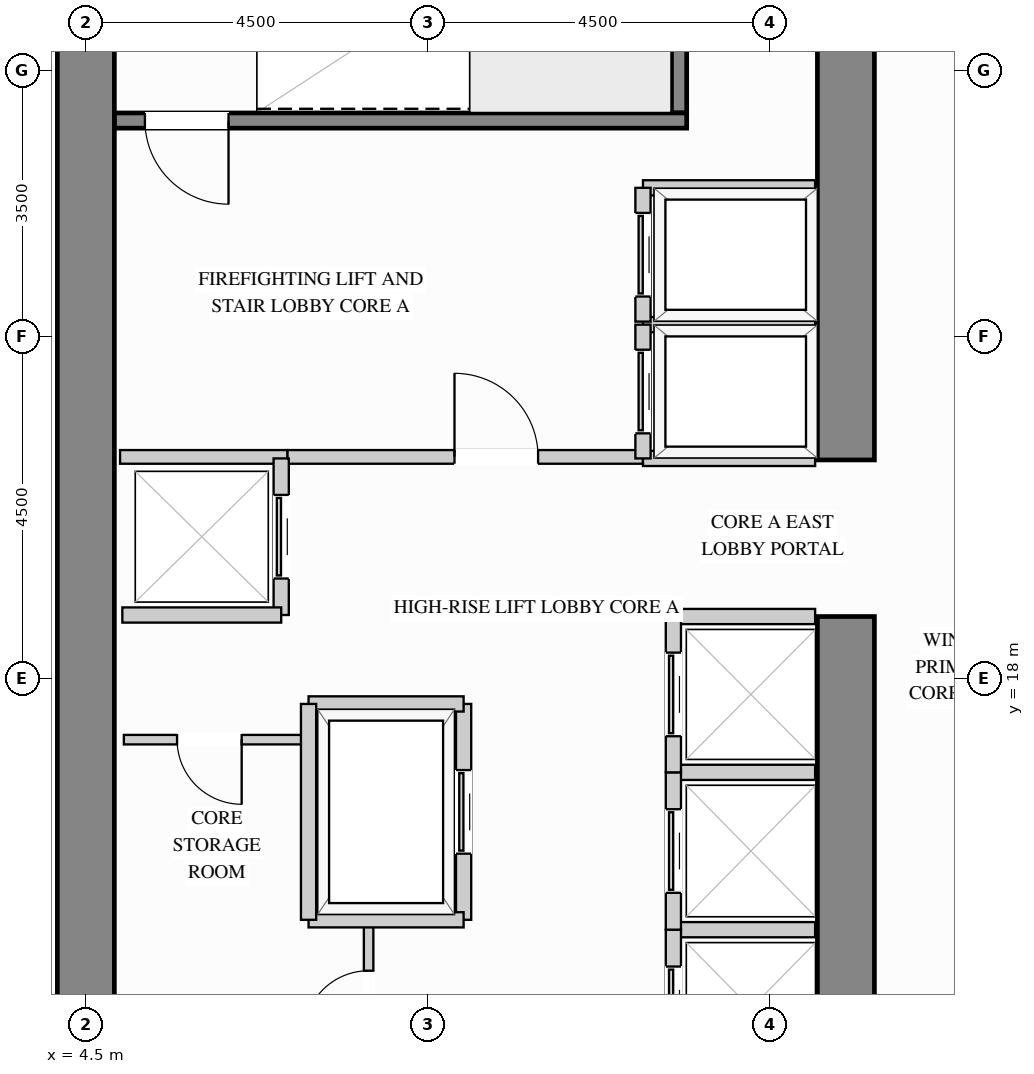
"""IFC4 building model, lengths in metres.
Left out: names, types, materials, properties, quantities, classifications, styles, units other than length and angle.
Written with IfcOpenShell. Run it as: python <this file> out.ifc"""

import sys

from ifc_helpers import new_model, si_unit, direction, frame, frame_2d, origin, place, context, subcontext, project, spatial, rectangle, extrude, source, transform, mapped, element, fill, save


model = new_model("IFC4")
c1 = context("Model", 3, precision=1e-05, world=origin(), true_north=direction((0.0, 1.0)))
c2 = subcontext(c1, "Body", "Model", "MODEL_VIEW")
j1 = project(units=[si_unit("LENGTHUNIT", "METRE"), si_unit("PLANEANGLEUNIT", "RADIAN")], contexts=[c1])
p1 = place(None, origin())
s1 = spatial("IfcSite", under=j1, at=p1, CompositionType="ELEMENT")
p2 = place(p1, origin())
s2 = spatial("IfcBuilding", under=s1, at=p2, CompositionType="ELEMENT")
p3 = place(p2, frame((0.0, 0.0, 106.2)))
s3 = spatial("IfcBuildingStorey", under=s2, at=p3, CompositionType="ELEMENT", Elevation=106.2)
m1 = source(origin(), c2, "Body", "SweptSolid", [
    extrude(rectangle(XDim=9.945, YDim=0.75, at=frame_2d((4.973, 0.0))), origin(), (0.0, 0.0, 1.0), 3.38),
])
p4 = place(p3, frame((14.5, 8.875, 0.0), z_axis=(0.0, 0.0, 1.0), x_axis=(0.0, 1.0, 0.0)))
e1 = element("IfcWall", 1, at=p4, inside=s3, PredefinedType="SHEAR", context=c2, shape_type="MappedRepresentation", body=[
    mapped(m1, transform((0.0, 0.0, 0.0), x_axis=(1.0, 0.0, 0.0), y_axis=(0.0, 1.0, 0.0), z_axis=(0.0, 0.0, 1.0))),
])
m2 = source(origin(), c2, "Body", "SweptSolid", [
    extrude(rectangle(XDim=8.245, YDim=0.75, at=frame_2d((4.123, 0.0))), origin(), (0.0, 0.0, 1.0), 3.38),
])
p5 = place(p3, frame((14.5, 20.88, 0.0), z_axis=(0.0, 0.0, 1.0), x_axis=(0.0, 1.0, 0.0)))
e2 = element("IfcWall", 2, at=p5, inside=s3, PredefinedType="SHEAR", context=c2, shape_type="MappedRepresentation", body=[
    mapped(m2, transform((0.0, 0.0, 0.0), x_axis=(1.0, 0.0, 0.0), y_axis=(0.0, 1.0, 0.0), z_axis=(0.0, 0.0, 1.0))),
])
m3 = source(origin(), c2, "Body", "SweptSolid", [
    extrude(rectangle(XDim=20.25, YDim=0.75, at=frame_2d((10.125, 0.0))), origin(), (0.0, 0.0, 1.0), 3.38),
])
p6 = place(p3, frame((4.5, 8.875, 0.0), z_axis=(0.0, 0.0, 1.0), x_axis=(0.0, 1.0, 0.0)))
e3 = element("IfcWall", 3, at=p6, inside=s3, PredefinedType="SHEAR", context=c2, shape_type="MappedRepresentation", body=[
    mapped(m3, transform((0.0, 0.0, 0.0), x_axis=(1.0, 0.0, 0.0), y_axis=(0.0, 1.0, 0.0), z_axis=(0.0, 0.0, 1.0))),
])
p7 = place(p3, frame((7.15, 20.92, 0.0), z_axis=(0.0, 0.0, 1.0), x_axis=(1.0, 0.0, 0.0)))
e4 = element("IfcWall", 4, at=p7, inside=s3, PredefinedType="PARTITIONING", context=c2, shape_type="SweptSolid", body=[
    extrude(rectangle(XDim=4.68, YDim=0.18, at=frame_2d((2.34, 0.0))), origin(), (0.0, 0.0, 1.0), 3.365),
])
p8 = place(p7, frame((2.2, 0.0, 0.0)))
e5 = element("IfcOpeningElement", 5, at=p8, cuts=e4, PredefinedType="OPENING", context=c2, shape_type="SweptSolid", body=[
    extrude(rectangle(XDim=1.1, YDim=2.15, at=frame_2d((0.55, 1.075))), frame((0.0, 0.1, 0.0), z_axis=(0.0, -1.0, 0.0), x_axis=(1.0, 0.0, 0.0)), (0.0, 0.0, 1.0), 0.2),
])
m4 = source(origin(), c2, "Body", "SweptSolid", [
    extrude(rectangle(XDim=2.2, YDim=0.18, at=frame_2d((1.1, 0.0))), origin(), (0.0, 0.0, 1.0), 3.365),
])
p9 = place(p3, frame((4.95, 20.92, 0.0), z_axis=(0.0, 0.0, 1.0), x_axis=(1.0, 0.0, 0.0)))
e6 = element("IfcWall", 6, at=p9, inside=s3, PredefinedType="PARTITIONING", context=c2, shape_type="MappedRepresentation", body=[
    mapped(m4, transform((0.0, 0.0, 0.0), x_axis=(1.0, 0.0, 0.0), y_axis=(0.0, 1.0, 0.0), z_axis=(0.0, 0.0, 1.0))),
])
p10 = place(p3, frame((8.22, 12.75, 0.0), z_axis=(0.0, 0.0, 1.0), x_axis=(0.0, 1.0, 0.0)))
e7 = element("IfcWall", 7, at=p10, inside=s3, PredefinedType="PARTITIONING", context=c2, shape_type="SweptSolid", body=[
    extrude(rectangle(XDim=2.07, YDim=0.125, at=frame_2d((1.035, 0.0))), origin(), (0.0, 0.0, 1.0), 3.365),
])
p11 = place(p10, frame((0.56, 0.0, 0.0)))
e8 = element("IfcOpeningElement", 8, at=p11, cuts=e7, PredefinedType="OPENING", context=c2, shape_type="SweptSolid", body=[
    extrude(rectangle(XDim=0.85, YDim=2.1, at=frame_2d((0.425, 1.05))), frame((0.0, 0.073, 0.0), z_axis=(0.0, -1.0, 0.0), x_axis=(1.0, 0.0, 0.0)), (0.0, 0.0, 1.0), 0.145),
])
p12 = place(p3, frame((5.0, 17.2, 0.0), z_axis=(0.0, 0.0, 1.0), x_axis=(1.0, 0.0, 0.0)))
e9 = element("IfcWall", 9, at=p12, inside=s3, PredefinedType="PARTITIONING", context=c2, shape_type="SweptSolid", body=[
    extrude(rectangle(XDim=2.4, YDim=0.125, at=frame_2d((1.2, 0.0))), origin(), (0.0, 0.0, 1.0), 3.365),
])
p13 = place(p12, frame((0.7, 0.0, 0.0)))
e10 = element("IfcOpeningElement", 10, at=p13, cuts=e9, PredefinedType="OPENING", context=c2, shape_type="SweptSolid", body=[
    extrude(rectangle(XDim=0.85, YDim=2.1, at=frame_2d((0.425, 1.05))), frame((0.0, 0.073, 0.0), z_axis=(0.0, -1.0, 0.0), x_axis=(1.0, 0.0, 0.0)), (0.0, 0.0, 1.0), 0.145),
])
m5 = source(origin(), c2, "Body", "SweptSolid", [
    extrude(rectangle(XDim=2.265, YDim=0.2, at=frame_2d((1.132, 0.0))), origin(), (0.0, 0.0, 1.0), 3.365),
])
for number, where, z_axis, x_axis in (
    (11, (11.83, 22.66, 0.0), (0.0, 0.0, 1.0), (1.0, 0.0, 0.0)),
    (12, (11.83, 20.9, 0.0), (0.0, 0.0, 1.0), (1.0, 0.0, 0.0)),
):
    element("IfcWall", number, at=place(p3, frame(where, z_axis=z_axis, x_axis=x_axis)), inside=s3, PredefinedType="PARTITIONING", context=c2, shape_type="MappedRepresentation", body=[
        mapped(m5, transform((0.0, 0.0, 0.0), x_axis=(1.0, 0.0, 0.0), y_axis=(0.0, 1.0, 0.0), z_axis=(0.0, 0.0, 1.0))),
    ])
p14 = place(p3, frame((11.83, 20.9, 0.0), z_axis=(0.0, 0.0, 1.0), x_axis=(0.0, 1.0, 0.0)))
e13 = element("IfcWall", 13, at=p14, inside=s3, PredefinedType="PARTITIONING", context=c2, shape_type="SweptSolid", body=[
    extrude(rectangle(XDim=1.76, YDim=0.2, at=frame_2d((0.88, 0.0))), origin(), (0.0, 0.0, 1.0), 3.365),
])
p15 = place(p14, frame((0.33, 0.0, 0.0)))
e14 = element("IfcOpeningElement", 14, at=p15, cuts=e13, PredefinedType="OPENING", context=c2, shape_type="SweptSolid", body=[
    extrude(rectangle(XDim=1.1, YDim=2.2, at=frame_2d((0.55, 1.1))), frame((0.0, 0.11, 0.0), z_axis=(0.0, -1.0, 0.0), x_axis=(1.0, 0.0, 0.0)), (0.0, 0.0, 1.0), 0.22),
])
p16 = place(p3, frame((11.83, 24.46, 0.0), z_axis=(0.0, 0.0, 1.0), x_axis=(1.0, 0.0, 0.0)))
e15 = element("IfcWall", 15, at=p16, inside=s3, PredefinedType="PARTITIONING", context=c2, shape_type="MappedRepresentation", body=[
    mapped(m5, transform((0.0, 0.0, 0.0), x_axis=(1.0, 0.0, 0.0), y_axis=(0.0, 1.0, 0.0), z_axis=(0.0, 0.0, 1.0))),
])
p17 = place(p3, frame((11.83, 22.7, 0.0), z_axis=(0.0, 0.0, 1.0), x_axis=(0.0, 1.0, 0.0)))
e16 = element("IfcWall", 16, at=p17, inside=s3, PredefinedType="PARTITIONING", context=c2, shape_type="SweptSolid", body=[
    extrude(rectangle(XDim=1.76, YDim=0.2, at=frame_2d((0.88, 0.0))), origin(), (0.0, 0.0, 1.0), 3.365),
])
p18 = place(p17, frame((0.33, 0.0, 0.0)))
e17 = element("IfcOpeningElement", 17, at=p18, cuts=e16, PredefinedType="OPENING", context=c2, shape_type="SweptSolid", body=[
    extrude(rectangle(XDim=1.1, YDim=2.2, at=frame_2d((0.55, 1.1))), frame((0.0, 0.11, 0.0), z_axis=(0.0, -1.0, 0.0), x_axis=(1.0, 0.0, 0.0)), (0.0, 0.0, 1.0), 0.22),
])
m6 = source(origin(), c2, "Body", "SweptSolid", [
    extrude(rectangle(XDim=1.865, YDim=0.2, at=frame_2d((0.933, 0.0))), origin(), (0.0, 0.0, 1.0), 3.365),
])
p19 = place(p3, frame((12.23, 14.7, 0.0), z_axis=(0.0, 0.0, 1.0), x_axis=(1.0, 0.0, 0.0)))
e18 = element("IfcWall", 18, at=p19, inside=s3, PredefinedType="PARTITIONING", context=c2, shape_type="MappedRepresentation", body=[
    mapped(m6, transform((0.0, 0.0, 0.0), x_axis=(1.0, 0.0, 0.0), y_axis=(0.0, 1.0, 0.0), z_axis=(0.0, 0.0, 1.0))),
])
p20 = place(p3, frame((12.23, 12.63, 0.0), z_axis=(0.0, 0.0, 1.0), x_axis=(0.0, 1.0, 0.0)))
e19 = element("IfcWall", 19, at=p20, inside=s3, PredefinedType="PARTITIONING", context=c2, shape_type="SweptSolid", body=[
    extrude(rectangle(XDim=2.07, YDim=0.2, at=frame_2d((1.035, 0.0))), origin(), (0.0, 0.0, 1.0), 3.365),
])
p21 = place(p20, frame((0.485, 0.0, 0.0)))
e20 = element("IfcOpeningElement", 20, at=p21, cuts=e19, PredefinedType="OPENING", context=c2, shape_type="SweptSolid", body=[
    extrude(rectangle(XDim=1.1, YDim=2.2, at=frame_2d((0.55, 1.1))), frame((0.0, 0.11, 0.0), z_axis=(0.0, -1.0, 0.0), x_axis=(1.0, 0.0, 0.0)), (0.0, 0.0, 1.0), 0.22),
])
p22 = place(p3, frame((12.23, 16.77, 0.0), z_axis=(0.0, 0.0, 1.0), x_axis=(1.0, 0.0, 0.0)))
e21 = element("IfcWall", 21, at=p22, inside=s3, PredefinedType="PARTITIONING", context=c2, shape_type="MappedRepresentation", body=[
    mapped(m6, transform((0.0, 0.0, 0.0), x_axis=(1.0, 0.0, 0.0), y_axis=(0.0, 1.0, 0.0), z_axis=(0.0, 0.0, 1.0))),
])
p23 = place(p3, frame((12.23, 14.7, 0.0), z_axis=(0.0, 0.0, 1.0), x_axis=(0.0, 1.0, 0.0)))
e22 = element("IfcWall", 22, at=p23, inside=s3, PredefinedType="PARTITIONING", context=c2, shape_type="SweptSolid", body=[
    extrude(rectangle(XDim=2.07, YDim=0.2, at=frame_2d((1.035, 0.0))), origin(), (0.0, 0.0, 1.0), 3.365),
])
p24 = place(p23, frame((0.485, 0.0, 0.0)))
e23 = element("IfcOpeningElement", 23, at=p24, cuts=e22, PredefinedType="OPENING", context=c2, shape_type="SweptSolid", body=[
    extrude(rectangle(XDim=1.1, YDim=2.2, at=frame_2d((0.55, 1.1))), frame((0.0, 0.11, 0.0), z_axis=(0.0, -1.0, 0.0), x_axis=(1.0, 0.0, 0.0)), (0.0, 0.0, 1.0), 0.22),
])
p25 = place(p3, frame((12.23, 18.82, 0.0), z_axis=(0.0, 0.0, 1.0), x_axis=(1.0, 0.0, 0.0)))
e24 = element("IfcWall", 24, at=p25, inside=s3, PredefinedType="PARTITIONING", context=c2, shape_type="MappedRepresentation", body=[
    mapped(m6, transform((0.0, 0.0, 0.0), x_axis=(1.0, 0.0, 0.0), y_axis=(0.0, 1.0, 0.0), z_axis=(0.0, 0.0, 1.0))),
])
p26 = place(p3, frame((12.23, 16.77, 0.0), z_axis=(0.0, 0.0, 1.0), x_axis=(0.0, 1.0, 0.0)))
e25 = element("IfcWall", 25, at=p26, inside=s3, PredefinedType="PARTITIONING", context=c2, shape_type="SweptSolid", body=[
    extrude(rectangle(XDim=2.05, YDim=0.2, at=frame_2d((1.025, 0.0))), origin(), (0.0, 0.0, 1.0), 3.365),
])
p27 = place(p26, frame((0.475, 0.0, 0.0)))
e26 = element("IfcOpeningElement", 26, at=p27, cuts=e25, PredefinedType="OPENING", context=c2, shape_type="SweptSolid", body=[
    extrude(rectangle(XDim=1.1, YDim=2.2, at=frame_2d((0.55, 1.1))), frame((0.0, 0.11, 0.0), z_axis=(0.0, -1.0, 0.0), x_axis=(1.0, 0.0, 0.0)), (0.0, 0.0, 1.0), 0.22),
])
p28 = place(p3, frame((7.07, 18.84, 0.0), z_axis=(0.0, 0.0, 1.0), x_axis=(0.0, 1.0, 0.0)))
e27 = element("IfcWall", 27, at=p28, inside=s3, PredefinedType="PARTITIONING", context=c2, shape_type="SweptSolid", body=[
    extrude(rectangle(XDim=2.06, YDim=0.2, at=frame_2d((1.03, 0.0))), origin(), (0.0, 0.0, 1.0), 3.365),
])
p29 = place(p28, frame((0.48, 0.0, 0.0)))
e28 = element("IfcOpeningElement", 28, at=p29, cuts=e27, PredefinedType="OPENING", context=c2, shape_type="SweptSolid", body=[
    extrude(rectangle(XDim=1.1, YDim=2.2, at=frame_2d((0.55, 1.1))), frame((0.0, 0.11, 0.0), z_axis=(0.0, -1.0, 0.0), x_axis=(1.0, 0.0, 0.0)), (0.0, 0.0, 1.0), 0.22),
])
m7 = source(origin(), c2, "Body", "SweptSolid", [
    extrude(rectangle(XDim=2.09, YDim=0.2, at=frame_2d((1.045, 0.0))), origin(), (0.0, 0.0, 1.0), 3.365),
])
p30 = place(p3, frame((4.98, 18.84, 0.0), z_axis=(0.0, 0.0, 1.0), x_axis=(1.0, 0.0, 0.0)))
e29 = element("IfcWall", 29, at=p30, inside=s3, PredefinedType="PARTITIONING", context=c2, shape_type="MappedRepresentation", body=[
    mapped(m7, transform((0.0, 0.0, 0.0), x_axis=(1.0, 0.0, 0.0), y_axis=(0.0, 1.0, 0.0), z_axis=(0.0, 0.0, 1.0))),
])
p31 = place(p3, frame((9.47, 14.83, 0.0), z_axis=(0.0, 0.0, 1.0), x_axis=(0.0, 1.0, 0.0)))
e30 = element("IfcWall", 30, at=p31, inside=s3, PredefinedType="PARTITIONING", context=c2, shape_type="SweptSolid", body=[
    extrude(rectangle(XDim=2.84, YDim=0.2, at=frame_2d((1.42, 0.0))), origin(), (0.0, 0.0, 1.0), 3.365),
])
p32 = place(p31, frame((0.87, 0.0, 0.0)))
e31 = element("IfcOpeningElement", 31, at=p32, cuts=e30, PredefinedType="OPENING", context=c2, shape_type="SweptSolid", body=[
    extrude(rectangle(XDim=1.1, YDim=2.2, at=frame_2d((0.55, 1.1))), frame((0.0, 0.11, 0.0), z_axis=(0.0, -1.0, 0.0), x_axis=(1.0, 0.0, 0.0)), (0.0, 0.0, 1.0), 0.22),
])
m8 = source(origin(), c2, "Body", "SweptSolid", [
    extrude(rectangle(XDim=2.04, YDim=0.2, at=frame_2d((1.02, 0.0))), origin(), (0.0, 0.0, 1.0), 3.365),
])
for number, where, z_axis, x_axis in (
    (32, (7.43, 17.67, 0.0), (0.0, 0.0, 1.0), (1.0, 0.0, 0.0)),
    (33, (7.43, 14.83, 0.0), (0.0, 0.0, 1.0), (1.0, 0.0, 0.0)),
):
    element("IfcWall", number, at=place(p3, frame(where, z_axis=z_axis, x_axis=x_axis)), inside=s3, PredefinedType="PARTITIONING", context=c2, shape_type="MappedRepresentation", body=[
        mapped(m8, transform((0.0, 0.0, 0.0), x_axis=(1.0, 0.0, 0.0), y_axis=(0.0, 1.0, 0.0), z_axis=(0.0, 0.0, 1.0))),
    ])
m9 = source(origin(), c2, "Body", "SweptSolid", [
    extrude(rectangle(XDim=2.84, YDim=0.2, at=frame_2d((1.42, 0.0))), origin(), (0.0, 0.0, 1.0), 3.365),
])
p33 = place(p3, frame((7.43, 14.83, 0.0), z_axis=(0.0, 0.0, 1.0), x_axis=(0.0, 1.0, 0.0)))
e34 = element("IfcWall", 34, at=p33, inside=s3, PredefinedType="PARTITIONING", context=c2, shape_type="MappedRepresentation", body=[
    mapped(m9, transform((0.0, 0.0, 0.0), x_axis=(1.0, 0.0, 0.0), y_axis=(0.0, 1.0, 0.0), z_axis=(0.0, 0.0, 1.0))),
])
m10 = source(origin(), c2, "Body", "SweptSolid", [
    extrude(rectangle(XDim=3.678, YDim=0.2, at=frame_2d((1.839, 0.0))), origin(), (0.0, 0.0, 1.0), 3.38),
])
p34 = place(p3, frame((12.305, 25.445, 0.0), z_axis=(0.0, 0.0, 1.0), x_axis=(0.0, 1.0, 0.0)))
e35 = element("IfcWall", 35, at=p34, inside=s3, PredefinedType="SHEAR", context=c2, shape_type="MappedRepresentation", body=[
    mapped(m10, transform((0.0, 0.0, 0.0), x_axis=(1.0, 0.0, 0.0), y_axis=(0.0, 1.0, 0.0), z_axis=(0.0, 0.0, 1.0))),
])
p35 = place(p3, frame((4.877, 25.345, 0.0), z_axis=(0.0, 0.0, 1.0), x_axis=(1.0, 0.0, 0.0)))
e36 = element("IfcWall", 36, at=p35, inside=s3, PredefinedType="SHEAR", context=c2, shape_type="SweptSolid", body=[
    extrude(rectangle(XDim=7.528, YDim=0.2, at=frame_2d((3.764, 0.0))), origin(), (0.0, 0.0, 1.0), 3.38),
])
p36 = place(p35, frame((0.4, 0.0, 0.0)))
e37 = element("IfcOpeningElement", 37, at=p36, cuts=e36, PredefinedType="OPENING", context=c2, shape_type="SweptSolid", body=[
    extrude(rectangle(XDim=1.1, YDim=2.15, at=frame_2d((0.55, 1.075))), frame((0.0, 0.11, 0.0), z_axis=(0.0, -1.0, 0.0), x_axis=(1.0, 0.0, 0.0)), (0.0, 0.0, 1.0), 0.22),
])
m11 = source(origin(), c2, "Body", "SweptSolid", [
    extrude(rectangle(XDim=1.1, YDim=2.15, at=frame_2d((0.55, 1.075))), frame((0.0, 0.025, 0.0), z_axis=(0.0, -1.0, 0.0), x_axis=(1.0, 0.0, 0.0)), (0.0, 0.0, 1.0), 0.05),
])
p37 = place(p8, origin())
e38 = element("IfcDoor", 38, at=p37, inside=s3, OperationType="SINGLE_SWING_LEFT", PredefinedType="DOOR", context=c2, shape_type="MappedRepresentation", body=[
    mapped(m11, transform((0.0, 0.0, 0.0), x_axis=(1.0, 0.0, 0.0), y_axis=(0.0, 1.0, 0.0), z_axis=(0.0, 0.0, 1.0))),
])
fill(e5, e38)
m12 = source(origin(), c2, "Body", "SweptSolid", [
    extrude(rectangle(XDim=1.1, YDim=2.2, at=frame_2d((0.55, 1.1))), frame((0.0, 0.025, 0.0), z_axis=(0.0, -1.0, 0.0), x_axis=(1.0, 0.0, 0.0)), (0.0, 0.0, 1.0), 0.05),
])
p38 = place(p15, origin())
e39 = element("IfcDoor", 39, at=p38, inside=s3, OperationType="SLIDING_TO_LEFT", PredefinedType="DOOR", context=c2, shape_type="MappedRepresentation", body=[
    mapped(m12, transform((0.0, 0.0, 0.0), x_axis=(1.0, 0.0, 0.0), y_axis=(0.0, 1.0, 0.0), z_axis=(0.0, 0.0, 1.0))),
])
fill(e14, e39)
p39 = place(p18, origin())
e40 = element("IfcDoor", 40, at=p39, inside=s3, OperationType="SLIDING_TO_LEFT", PredefinedType="DOOR", context=c2, shape_type="MappedRepresentation", body=[
    mapped(m12, transform((0.0, 0.0, 0.0), x_axis=(1.0, 0.0, 0.0), y_axis=(0.0, 1.0, 0.0), z_axis=(0.0, 0.0, 1.0))),
])
fill(e17, e40)
p40 = place(p21, origin())
e41 = element("IfcDoor", 41, at=p40, inside=s3, OperationType="SLIDING_TO_LEFT", PredefinedType="DOOR", context=c2, shape_type="MappedRepresentation", body=[
    mapped(m12, transform((0.0, 0.0, 0.0), x_axis=(1.0, 0.0, 0.0), y_axis=(0.0, 1.0, 0.0), z_axis=(0.0, 0.0, 1.0))),
])
fill(e20, e41)
p41 = place(p24, origin())
e42 = element("IfcDoor", 42, at=p41, inside=s3, OperationType="SLIDING_TO_LEFT", PredefinedType="DOOR", context=c2, shape_type="MappedRepresentation", body=[
    mapped(m12, transform((0.0, 0.0, 0.0), x_axis=(1.0, 0.0, 0.0), y_axis=(0.0, 1.0, 0.0), z_axis=(0.0, 0.0, 1.0))),
])
fill(e23, e42)
p42 = place(p27, origin())
e43 = element("IfcDoor", 43, at=p42, inside=s3, OperationType="SLIDING_TO_LEFT", PredefinedType="DOOR", context=c2, shape_type="MappedRepresentation", body=[
    mapped(m12, transform((0.0, 0.0, 0.0), x_axis=(1.0, 0.0, 0.0), y_axis=(0.0, 1.0, 0.0), z_axis=(0.0, 0.0, 1.0))),
])
fill(e26, e43)
p43 = place(p29, origin())
e44 = element("IfcDoor", 44, at=p43, inside=s3, OperationType="SLIDING_TO_LEFT", PredefinedType="DOOR", context=c2, shape_type="MappedRepresentation", body=[
    mapped(m12, transform((0.0, 0.0, 0.0), x_axis=(1.0, 0.0, 0.0), y_axis=(0.0, 1.0, 0.0), z_axis=(0.0, 0.0, 1.0))),
])
fill(e28, e44)
p44 = place(p32, origin())
e45 = element("IfcDoor", 45, at=p44, inside=s3, OperationType="SLIDING_TO_LEFT", PredefinedType="DOOR", context=c2, shape_type="MappedRepresentation", body=[
    mapped(m12, transform((0.0, 0.0, 0.0), x_axis=(1.0, 0.0, 0.0), y_axis=(0.0, 1.0, 0.0), z_axis=(0.0, 0.0, 1.0))),
])
fill(e31, e45)
m13 = source(origin(), c2, "Body", "SweptSolid", [
    extrude(rectangle(XDim=0.85, YDim=2.1, at=frame_2d((0.425, 1.05))), frame((0.0, 0.025, 0.0), z_axis=(0.0, -1.0, 0.0), x_axis=(1.0, 0.0, 0.0)), (0.0, 0.0, 1.0), 0.05),
])
p45 = place(p13, origin())
e46 = element("IfcDoor", 46, at=p45, inside=s3, OperationType="SINGLE_SWING_RIGHT", PredefinedType="DOOR", context=c2, shape_type="MappedRepresentation", body=[
    mapped(m13, transform((0.0, 0.0, 0.0), x_axis=(1.0, 0.0, 0.0), y_axis=(0.0, 1.0, 0.0), z_axis=(0.0, 0.0, 1.0))),
])
fill(e10, e46)
p46 = place(p11, origin())
e47 = element("IfcDoor", 47, at=p46, inside=s3, OperationType="SINGLE_SWING_LEFT", PredefinedType="DOOR", context=c2, shape_type="MappedRepresentation", body=[
    mapped(m13, transform((0.0, 0.0, 0.0), x_axis=(1.0, 0.0, 0.0), y_axis=(0.0, 1.0, 0.0), z_axis=(0.0, 0.0, 1.0))),
])
fill(e8, e47)
m14 = source(origin(), c2, "Body", "SweptSolid", [
    extrude(rectangle(XDim=1.1, YDim=2.15, at=frame_2d((0.55, 1.075))), frame((0.0, 0.025, 0.0), z_axis=(0.0, -1.0, 0.0), x_axis=(1.0, 0.0, 0.0)), (0.0, 0.0, 1.0), 0.05),
])
p47 = place(p36, origin())
e48 = element("IfcDoor", 48, at=p47, inside=s3, OperationType="SINGLE_SWING_RIGHT", PredefinedType="DOOR", context=c2, shape_type="MappedRepresentation", body=[
    mapped(m14, transform((0.0, 0.0, 0.0), x_axis=(1.0, 0.0, 0.0), y_axis=(0.0, 1.0, 0.0), z_axis=(0.0, 0.0, 1.0))),
])
fill(e37, e48)
save(model, sys.argv[1])
